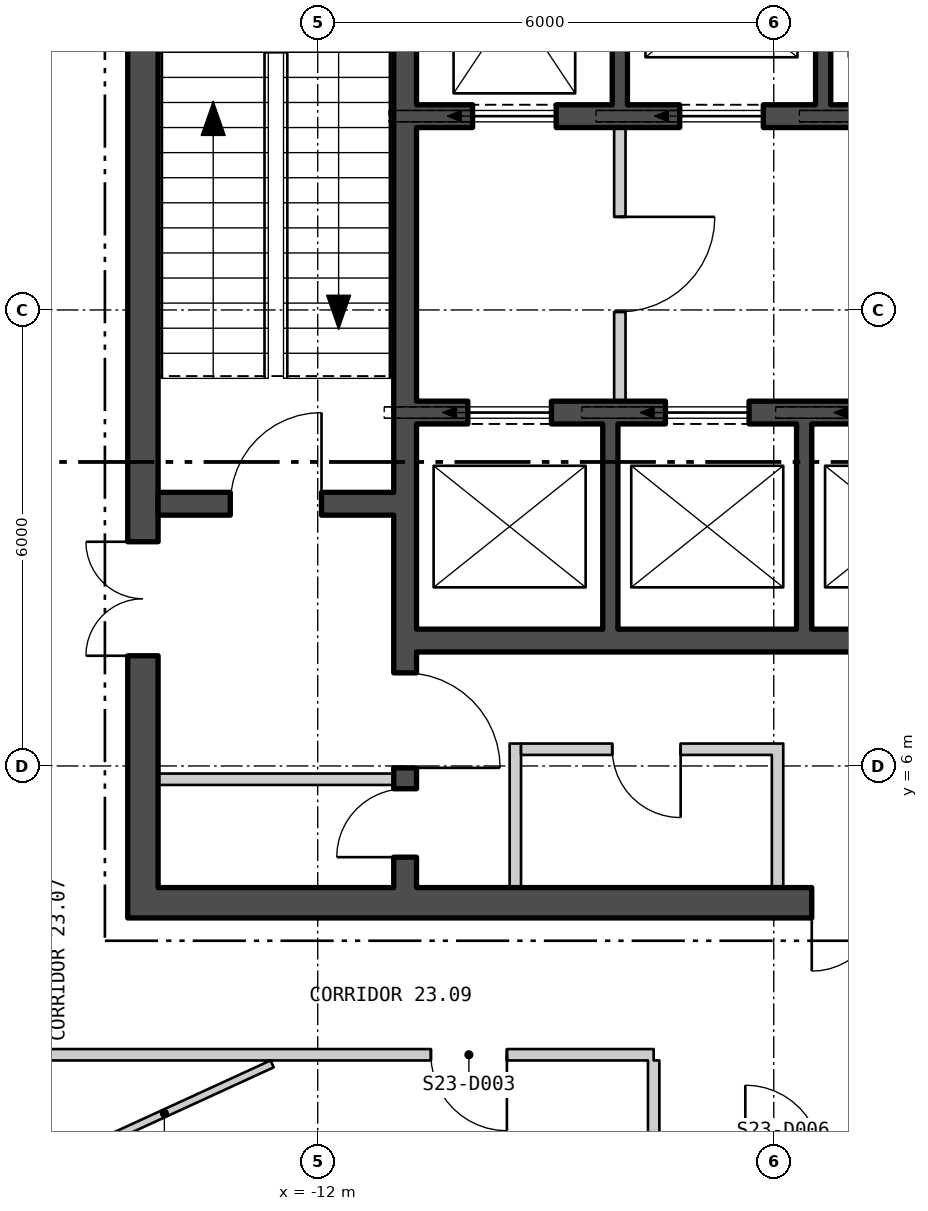
"""IFC4 building model, lengths in metres.
Left out: names, types, materials, properties, quantities, classifications, styles, units other than length and angle.
Written with IfcOpenShell. Run it as: python <this file> out.ifc"""

import sys

from ifc_helpers import new_model, si_unit, direction, frame, frame_2d, origin, place, context, subcontext, project, spatial, polyline, rectangle, outline, extrude, element, fill, save


model = new_model("IFC4")
c1 = context("Model", 3, precision=1e-05, world=origin(), true_north=direction((0.0, 1.0)))
c2 = subcontext(c1, "Body", "Model", "MODEL_VIEW")
j1 = project(units=[si_unit("LENGTHUNIT", "METRE"), si_unit("PLANEANGLEUNIT", "RADIAN")], contexts=[c1])
p1 = place(None, origin())
s1 = spatial("IfcSite", under=j1, at=p1, CompositionType="ELEMENT")
p2 = place(p1, origin())
s2 = spatial("IfcBuilding", under=s1, at=p2, CompositionType="ELEMENT")
p3 = place(p2, frame((0.0, 0.0, 304.2)))
s3 = spatial("IfcBuildingStorey", under=s2, at=p3, CompositionType="ELEMENT", Elevation=304.2)
p4 = place(p3, frame((-25.095, 16.112, -0.18), z_axis=(0.0, 0.0, 1.0), x_axis=(0.500000141277, -0.866025322218, 0.0)))
e1 = element("IfcWall", 1, at=p4, inside=s3, PredefinedType="SOLIDWALL", context=c2, shape_type="SweptSolid", body=[
    extrude(outline(polyline([(-0.13, -0.225), (45.86, -0.225), (45.6, 0.225), (0.13, 0.225), (-0.13, -0.225)])), origin(), (0.0, 0.0, 1.0), 3.98),
])
p5 = place(p4, frame((1.424, 0.0, 1.08)))
e2 = element("IfcOpeningElement", 2, at=p5, cuts=e1, PredefinedType="OPENING", context=c2, shape_type="SweptSolid", body=[
    extrude(rectangle(XDim=2.4, YDim=2.3, at=frame_2d((1.2, 1.15))), frame((0.0, 0.235, 0.0), z_axis=(0.0, -1.0, 0.0), x_axis=(1.0, 0.0, 0.0)), (0.0, 0.0, 1.0), 0.47),
])
p6 = place(p4, frame((5.892, 0.0, 1.08)))
e3 = element("IfcOpeningElement", 3, at=p6, cuts=e1, PredefinedType="OPENING", context=c2, shape_type="SweptSolid", body=[
    extrude(rectangle(XDim=2.4, YDim=2.3, at=frame_2d((1.2, 1.15))), frame((0.0, 0.235, 0.0), z_axis=(0.0, -1.0, 0.0), x_axis=(1.0, 0.0, 0.0)), (0.0, 0.0, 1.0), 0.47),
])
p7 = place(p4, frame((10.399, 0.0, 1.08)))
e4 = element("IfcOpeningElement", 4, at=p7, cuts=e1, PredefinedType="OPENING", context=c2, shape_type="SweptSolid", body=[
    extrude(rectangle(XDim=2.4, YDim=2.3, at=frame_2d((1.2, 1.15))), frame((0.0, 0.235, 0.0), z_axis=(0.0, -1.0, 0.0), x_axis=(1.0, 0.0, 0.0)), (0.0, 0.0, 1.0), 0.47),
])
p8 = place(p4, frame((14.905, 0.0, 1.08)))
e5 = element("IfcOpeningElement", 5, at=p8, cuts=e1, PredefinedType="OPENING", context=c2, shape_type="SweptSolid", body=[
    extrude(rectangle(XDim=2.4, YDim=2.3, at=frame_2d((1.2, 1.15))), frame((0.0, 0.235, 0.0), z_axis=(0.0, -1.0, 0.0), x_axis=(1.0, 0.0, 0.0)), (0.0, 0.0, 1.0), 0.47),
])
p9 = place(p4, frame((19.412, 0.0, 1.08)))
e6 = element("IfcOpeningElement", 6, at=p9, cuts=e1, PredefinedType="OPENING", context=c2, shape_type="SweptSolid", body=[
    extrude(rectangle(XDim=2.4, YDim=2.3, at=frame_2d((1.2, 1.15))), frame((0.0, 0.235, 0.0), z_axis=(0.0, -1.0, 0.0), x_axis=(1.0, 0.0, 0.0)), (0.0, 0.0, 1.0), 0.47),
])
p10 = place(p4, frame((28.425, 0.0, 1.08)))
e7 = element("IfcOpeningElement", 7, at=p10, cuts=e1, PredefinedType="OPENING", context=c2, shape_type="SweptSolid", body=[
    extrude(rectangle(XDim=2.4, YDim=2.3, at=frame_2d((1.2, 1.15))), frame((0.0, 0.235, 0.0), z_axis=(0.0, -1.0, 0.0), x_axis=(1.0, 0.0, 0.0)), (0.0, 0.0, 1.0), 0.47),
])
p11 = place(p4, frame((32.932, 0.0, 1.08)))
e8 = element("IfcOpeningElement", 8, at=p11, cuts=e1, PredefinedType="OPENING", context=c2, shape_type="SweptSolid", body=[
    extrude(rectangle(XDim=2.4, YDim=2.3, at=frame_2d((1.2, 1.15))), frame((0.0, 0.235, 0.0), z_axis=(0.0, -1.0, 0.0), x_axis=(1.0, 0.0, 0.0)), (0.0, 0.0, 1.0), 0.47),
])
p12 = place(p4, frame((37.438, 0.0, 1.08)))
e9 = element("IfcOpeningElement", 9, at=p12, cuts=e1, PredefinedType="OPENING", context=c2, shape_type="SweptSolid", body=[
    extrude(rectangle(XDim=2.4, YDim=2.3, at=frame_2d((1.2, 1.15))), frame((0.0, 0.235, 0.0), z_axis=(0.0, -1.0, 0.0), x_axis=(1.0, 0.0, 0.0)), (0.0, 0.0, 1.0), 0.47),
])
p13 = place(p4, frame((41.907, 0.0, 1.08)))
e10 = element("IfcOpeningElement", 10, at=p13, cuts=e1, PredefinedType="OPENING", context=c2, shape_type="SweptSolid", body=[
    extrude(rectangle(XDim=2.4, YDim=2.3, at=frame_2d((1.2, 1.15))), frame((0.0, 0.235, 0.0), z_axis=(0.0, -1.0, 0.0), x_axis=(1.0, 0.0, 0.0)), (0.0, 0.0, 1.0), 0.47),
])
p14 = place(p3, frame((-14.5, 4.2, 0.0), z_axis=(0.0, 0.0, 1.0), x_axis=(1.0, 0.0, 0.0)))
e11 = element("IfcWall", 11, at=p14, inside=s3, PredefinedType="SHEAR", context=c2, shape_type="SweptSolid", body=[
    extrude(rectangle(XDim=29.0, YDim=0.4, at=frame_2d((14.5, 0.0))), origin(), (0.0, 0.0, 1.0), 4.0),
])
p15 = place(p14, frame((9.0, 0.0, 0.0)))
e12 = element("IfcOpeningElement", 12, at=p15, cuts=e11, PredefinedType="OPENING", context=c2, shape_type="SweptSolid", body=[
    extrude(rectangle(XDim=1.8, YDim=2.4, at=frame_2d((0.9, 1.2))), frame((0.0, 0.21, 0.0), z_axis=(0.0, -1.0, 0.0), x_axis=(1.0, 0.0, 0.0)), (0.0, 0.0, 1.0), 0.42),
])
p16 = place(p14, frame((19.0, 0.0, 0.0)))
e13 = element("IfcOpeningElement", 13, at=p16, cuts=e11, PredefinedType="OPENING", context=c2, shape_type="SweptSolid", body=[
    extrude(rectangle(XDim=1.8, YDim=2.4, at=frame_2d((0.9, 1.2))), frame((0.0, 0.21, 0.0), z_axis=(0.0, -1.0, 0.0), x_axis=(1.0, 0.0, 0.0)), (0.0, 0.0, 1.0), 0.42),
])
p17 = place(p3, frame((-14.3, 4.4, 0.0), z_axis=(0.0, 0.0, 1.0), x_axis=(0.0, 1.0, 0.0)))
e14 = element("IfcWall", 14, at=p17, inside=s3, PredefinedType="SHEAR", context=c2, shape_type="SweptSolid", body=[
    extrude(rectangle(XDim=13.2, YDim=0.4, at=frame_2d((6.6, 0.0))), origin(), (0.0, 0.0, 1.0), 4.0),
])
p18 = place(p17, frame((3.05, 0.0, 0.0)))
e15 = element("IfcOpeningElement", 15, at=p18, cuts=e14, PredefinedType="OPENING", context=c2, shape_type="SweptSolid", body=[
    extrude(rectangle(XDim=1.5, YDim=2.1, at=frame_2d((0.75, 1.05))), frame((0.0, 0.21, 0.0), z_axis=(0.0, -1.0, 0.0), x_axis=(1.0, 0.0, 0.0)), (0.0, 0.0, 1.0), 0.42),
])
p19 = place(p3, frame((-10.85, 4.4, 0.0), z_axis=(0.0, 0.0, 1.0), x_axis=(0.0, 1.0, 0.0)))
e16 = element("IfcWall", 16, at=p19, inside=s3, PredefinedType="SHEAR", context=c2, shape_type="SweptSolid", body=[
    extrude(rectangle(XDim=13.2, YDim=0.3, at=frame_2d((6.6, 0.0))), origin(), (0.0, 0.0, 1.0), 4.0),
])
p20 = place(p19, frame((1.575, 0.0, 0.0)))
e17 = element("IfcOpeningElement", 17, at=p20, cuts=e16, PredefinedType="OPENING", context=c2, shape_type="SweptSolid", body=[
    extrude(rectangle(XDim=1.25, YDim=2.1, at=frame_2d((0.625, 1.05))), frame((0.0, 0.16, 0.0), z_axis=(0.0, -1.0, 0.0), x_axis=(1.0, 0.0, 0.0)), (0.0, 0.0, 1.0), 0.32),
])
p21 = place(p19, frame((0.4, 0.0, 0.0)))
e18 = element("IfcOpeningElement", 18, at=p21, cuts=e16, PredefinedType="OPENING", context=c2, shape_type="SweptSolid", body=[
    extrude(rectangle(XDim=0.9, YDim=2.1, at=frame_2d((0.45, 1.05))), frame((0.0, 0.16, 0.0), z_axis=(0.0, -1.0, 0.0), x_axis=(1.0, 0.0, 0.0)), (0.0, 0.0, 1.0), 0.32),
])
p22 = place(p3, frame((-14.1, 9.45, 0.0), z_axis=(0.0, 0.0, 1.0), x_axis=(1.0, 0.0, 0.0)))
e19 = element("IfcWall", 19, at=p22, inside=s3, PredefinedType="SHEAR", context=c2, shape_type="SweptSolid", body=[
    extrude(rectangle(XDim=3.1, YDim=0.3, at=frame_2d((1.55, 0.0))), origin(), (0.0, 0.0, 1.0), 4.0),
])
p23 = place(p22, frame((0.95, 0.0, 0.0)))
e20 = element("IfcOpeningElement", 20, at=p23, cuts=e19, PredefinedType="OPENING", context=c2, shape_type="SweptSolid", body=[
    extrude(rectangle(XDim=1.2, YDim=2.1, at=frame_2d((0.6, 1.05))), frame((0.0, 0.16, 0.0), z_axis=(0.0, -1.0, 0.0), x_axis=(1.0, 0.0, 0.0)), (0.0, 0.0, 1.0), 0.32),
])
p24 = place(p3, frame((-10.7, 14.55, 0.0), z_axis=(0.0, 0.0, 1.0), x_axis=(1.0, 0.0, 0.0)))
e21 = element("IfcWall", 21, at=p24, inside=s3, PredefinedType="SHEAR", context=c2, shape_type="SweptSolid", body=[
    extrude(rectangle(XDim=21.4, YDim=0.3, at=frame_2d((10.7, 0.0))), origin(), (0.0, 0.0, 1.0), 4.0),
])
p25 = place(p24, frame((0.738, 0.0, 0.0)))
e22 = element("IfcOpeningElement", 22, at=p25, cuts=e21, PredefinedType="OPENING", context=c2, shape_type="SweptSolid", body=[
    extrude(rectangle(XDim=1.1, YDim=2.1, at=frame_2d((0.55, 1.05))), frame((0.0, 0.16, 0.0), z_axis=(0.0, -1.0, 0.0), x_axis=(1.0, 0.0, 0.0)), (0.0, 0.0, 1.0), 0.32),
])
p26 = place(p24, frame((3.462, 0.0, 0.0)))
e23 = element("IfcOpeningElement", 23, at=p26, cuts=e21, PredefinedType="OPENING", context=c2, shape_type="SweptSolid", body=[
    extrude(rectangle(XDim=1.1, YDim=2.1, at=frame_2d((0.55, 1.05))), frame((0.0, 0.16, 0.0), z_axis=(0.0, -1.0, 0.0), x_axis=(1.0, 0.0, 0.0)), (0.0, 0.0, 1.0), 0.32),
])
p27 = place(p24, frame((6.138, 0.0, 0.0)))
e24 = element("IfcOpeningElement", 24, at=p27, cuts=e21, PredefinedType="OPENING", context=c2, shape_type="SweptSolid", body=[
    extrude(rectangle(XDim=1.1, YDim=2.1, at=frame_2d((0.55, 1.05))), frame((0.0, 0.16, 0.0), z_axis=(0.0, -1.0, 0.0), x_axis=(1.0, 0.0, 0.0)), (0.0, 0.0, 1.0), 0.32),
])
p28 = place(p24, frame((8.812, 0.0, 0.0)))
e25 = element("IfcOpeningElement", 25, at=p28, cuts=e21, PredefinedType="OPENING", context=c2, shape_type="SweptSolid", body=[
    extrude(rectangle(XDim=1.1, YDim=2.1, at=frame_2d((0.55, 1.05))), frame((0.0, 0.16, 0.0), z_axis=(0.0, -1.0, 0.0), x_axis=(1.0, 0.0, 0.0)), (0.0, 0.0, 1.0), 0.32),
])
p29 = place(p24, frame((19.562, 0.0, 0.0)))
e26 = element("IfcOpeningElement", 26, at=p29, cuts=e21, PredefinedType="OPENING", context=c2, shape_type="SweptSolid", body=[
    extrude(rectangle(XDim=1.1, YDim=2.1, at=frame_2d((0.55, 1.05))), frame((0.0, 0.16, 0.0), z_axis=(0.0, -1.0, 0.0), x_axis=(1.0, 0.0, 0.0)), (0.0, 0.0, 1.0), 0.32),
])
p30 = place(p24, frame((11.537, 0.0, 0.0)))
e27 = element("IfcOpeningElement", 27, at=p30, cuts=e21, PredefinedType="OPENING", context=c2, shape_type="SweptSolid", body=[
    extrude(rectangle(XDim=1.0, YDim=2.1, at=frame_2d((0.5, 1.05))), frame((0.0, 0.16, 0.0), z_axis=(0.0, -1.0, 0.0), x_axis=(1.0, 0.0, 0.0)), (0.0, 0.0, 1.0), 0.32),
])
p31 = place(p24, frame((14.213, 0.0, 0.0)))
e28 = element("IfcOpeningElement", 28, at=p31, cuts=e21, PredefinedType="OPENING", context=c2, shape_type="SweptSolid", body=[
    extrude(rectangle(XDim=1.0, YDim=2.1, at=frame_2d((0.5, 1.05))), frame((0.0, 0.16, 0.0), z_axis=(0.0, -1.0, 0.0), x_axis=(1.0, 0.0, 0.0)), (0.0, 0.0, 1.0), 0.32),
])
p32 = place(p24, frame((16.887, 0.0, 0.0)))
e29 = element("IfcOpeningElement", 29, at=p32, cuts=e21, PredefinedType="OPENING", context=c2, shape_type="SweptSolid", body=[
    extrude(rectangle(XDim=1.0, YDim=2.1, at=frame_2d((0.5, 1.05))), frame((0.0, 0.16, 0.0), z_axis=(0.0, -1.0, 0.0), x_axis=(1.0, 0.0, 0.0)), (0.0, 0.0, 1.0), 0.32),
])
p33 = place(p3, frame((-10.7, 10.65, 0.0), z_axis=(0.0, 0.0, 1.0), x_axis=(1.0, 0.0, 0.0)))
e30 = element("IfcWall", 30, at=p33, inside=s3, PredefinedType="SHEAR", context=c2, shape_type="SweptSolid", body=[
    extrude(rectangle(XDim=10.3, YDim=0.3, at=frame_2d((5.15, 0.0))), origin(), (0.0, 0.0, 1.0), 4.0),
])
p34 = place(p33, frame((0.675, 0.0, 0.0)))
e31 = element("IfcOpeningElement", 31, at=p34, cuts=e30, PredefinedType="OPENING", context=c2, shape_type="SweptSolid", body=[
    extrude(rectangle(XDim=1.1, YDim=2.1, at=frame_2d((0.55, 1.05))), frame((0.0, 0.16, 0.0), z_axis=(0.0, -1.0, 0.0), x_axis=(1.0, 0.0, 0.0)), (0.0, 0.0, 1.0), 0.32),
])
p35 = place(p33, frame((3.275, 0.0, 0.0)))
e32 = element("IfcOpeningElement", 32, at=p35, cuts=e30, PredefinedType="OPENING", context=c2, shape_type="SweptSolid", body=[
    extrude(rectangle(XDim=1.1, YDim=2.1, at=frame_2d((0.55, 1.05))), frame((0.0, 0.16, 0.0), z_axis=(0.0, -1.0, 0.0), x_axis=(1.0, 0.0, 0.0)), (0.0, 0.0, 1.0), 0.32),
])
p36 = place(p33, frame((5.825, 0.0, 0.0)))
e33 = element("IfcOpeningElement", 33, at=p36, cuts=e30, PredefinedType="OPENING", context=c2, shape_type="SweptSolid", body=[
    extrude(rectangle(XDim=1.1, YDim=2.1, at=frame_2d((0.55, 1.05))), frame((0.0, 0.16, 0.0), z_axis=(0.0, -1.0, 0.0), x_axis=(1.0, 0.0, 0.0)), (0.0, 0.0, 1.0), 0.32),
])
p37 = place(p33, frame((8.425, 0.0, 0.0)))
e34 = element("IfcOpeningElement", 34, at=p37, cuts=e30, PredefinedType="OPENING", context=c2, shape_type="SweptSolid", body=[
    extrude(rectangle(XDim=1.0, YDim=2.1, at=frame_2d((0.5, 1.05))), frame((0.0, 0.16, 0.0), z_axis=(0.0, -1.0, 0.0), x_axis=(1.0, 0.0, 0.0)), (0.0, 0.0, 1.0), 0.32),
])
p38 = place(p3, frame((-10.7, 7.65, 0.0), z_axis=(0.0, 0.0, 1.0), x_axis=(1.0, 0.0, 0.0)))
e35 = element("IfcWall", 35, at=p38, inside=s3, PredefinedType="SHEAR", context=c2, shape_type="SweptSolid", body=[
    extrude(rectangle(XDim=10.3, YDim=0.3, at=frame_2d((5.15, 0.0))), origin(), (0.0, 0.0, 1.0), 4.0),
])
for number, where, z_axis, x_axis in (
    (36, (-8.025, 14.7, 0.0), (0.0, 0.0, 1.0), (0.0, 1.0, 0.0)),
    (37, (-5.35, 14.7, 0.0), (0.0, 0.0, 1.0), (0.0, 1.0, 0.0)),
):
    element("IfcWall", number, at=place(p3, frame(where, z_axis=z_axis, x_axis=x_axis)), inside=s3, PredefinedType="SHEAR", context=c2, shape_type="SweptSolid", body=[
        extrude(rectangle(XDim=2.9, YDim=0.2, at=frame_2d((1.45, 0.0))), origin(), (0.0, 0.0, 1.0), 4.0),
    ])
for number, where, z_axis, x_axis in (
    (38, (-8.15, 7.8, 0.0), (0.0, 0.0, 1.0), (0.0, 1.0, 0.0)),
    (39, (-5.6, 7.8, 0.0), (0.0, 0.0, 1.0), (0.0, 1.0, 0.0)),
):
    element("IfcWall", number, at=place(p3, frame(where, z_axis=z_axis, x_axis=x_axis)), inside=s3, PredefinedType="SHEAR", context=c2, shape_type="SweptSolid", body=[
        extrude(rectangle(XDim=2.7, YDim=0.2, at=frame_2d((1.35, 0.0))), origin(), (0.0, 0.0, 1.0), 4.0),
    ])
p39 = place(p3, frame((-8.025, 10.8, 0.0), z_axis=(0.0, 0.0, 1.0), x_axis=(0.0, 1.0, 0.0)))
e40 = element("IfcWall", 40, at=p39, inside=s3, PredefinedType="PARTITIONING", context=c2, shape_type="SweptSolid", body=[
    extrude(rectangle(XDim=3.6, YDim=0.15, at=frame_2d((1.8, 0.0))), origin(), (0.0, 0.0, 1.0), 4.0),
])
p40 = place(p39, frame((1.175, 0.0, 0.0)))
e41 = element("IfcOpeningElement", 41, at=p40, cuts=e40, PredefinedType="OPENING", context=c2, shape_type="SweptSolid", body=[
    extrude(rectangle(XDim=1.25, YDim=2.1, at=frame_2d((0.625, 1.05))), frame((0.0, 0.085, 0.0), z_axis=(0.0, -1.0, 0.0), x_axis=(1.0, 0.0, 0.0)), (0.0, 0.0, 1.0), 0.17),
])
p41 = place(p3, frame((-14.1, 5.825, 0.0), z_axis=(0.0, 0.0, 1.0), x_axis=(1.0, 0.0, 0.0)))
e42 = element("IfcWall", 42, at=p41, inside=s3, PredefinedType="PARTITIONING", context=c2, shape_type="SweptSolid", body=[
    extrude(rectangle(XDim=3.1, YDim=0.15, at=frame_2d((1.55, 0.0))), origin(), (0.0, 0.0, 1.0), 4.0),
])
for number, where, z_axis, x_axis in (
    (43, (-9.4, 4.4, 0.0), (0.0, 0.0, 1.0), (0.0, 1.0, 0.0)),
    (44, (-5.95, 4.4, 0.0), (0.0, 0.0, 1.0), (0.0, 1.0, 0.0)),
):
    element("IfcWall", number, at=place(p3, frame(where, z_axis=z_axis, x_axis=x_axis)), inside=s3, PredefinedType="PARTITIONING", context=c2, shape_type="SweptSolid", body=[
        extrude(rectangle(XDim=1.895, YDim=0.15, at=frame_2d((0.948, 0.0))), origin(), (0.0, 0.0, 1.0), 4.0),
    ])
p42 = place(p3, frame((-9.325, 6.22, 0.0), z_axis=(0.0, 0.0, 1.0), x_axis=(1.0, 0.0, 0.0)))
e45 = element("IfcWall", 45, at=p42, inside=s3, PredefinedType="PARTITIONING", context=c2, shape_type="SweptSolid", body=[
    extrude(rectangle(XDim=3.3, YDim=0.15, at=frame_2d((1.65, 0.0))), origin(), (0.0, 0.0, 1.0), 4.0),
])
p43 = place(p42, frame((1.2, 0.0, 0.0)))
e46 = element("IfcOpeningElement", 46, at=p43, cuts=e45, PredefinedType="OPENING", context=c2, shape_type="SweptSolid", body=[
    extrude(rectangle(XDim=0.9, YDim=2.1, at=frame_2d((0.45, 1.05))), frame((0.0, 0.085, 0.0), z_axis=(0.0, -1.0, 0.0), x_axis=(1.0, 0.0, 0.0)), (0.0, 0.0, 1.0), 0.17),
])
p44 = place(p3, frame((-16.225, 2.2, 0.0), z_axis=(0.0, 0.0, 1.0), x_axis=(1.0, 0.0, 0.0)))
e47 = element("IfcWall", 47, at=p44, inside=s3, PredefinedType="PARTITIONING", context=c2, shape_type="SweptSolid", body=[
    extrude(rectangle(XDim=8.645, YDim=0.15, at=frame_2d((4.322, 0.0))), origin(), (0.0, 0.0, 1.0), 4.0),
])
p45 = place(p44, frame((5.714, 0.0, 0.0)))
e48 = element("IfcOpeningElement", 48, at=p45, cuts=e47, PredefinedType="OPENING", context=c2, shape_type="SweptSolid", body=[
    extrude(rectangle(XDim=1.0, YDim=2.1, at=frame_2d((0.5, 1.05))), frame((0.0, 0.085, 0.0), z_axis=(0.0, -1.0, 0.0), x_axis=(1.0, 0.0, 0.0)), (0.0, 0.0, 1.0), 0.17),
])
p46 = place(p3, frame((-15.435, 0.779, 0.0), z_axis=(0.0, 0.0, 1.0), x_axis=(0.908867400556, 0.417085180996, 0.0)))
e49 = element("IfcWall", 49, at=p46, inside=s3, PredefinedType="PARTITIONING", context=c2, shape_type="SweptSolid", body=[
    extrude(rectangle(XDim=3.119, YDim=0.1, at=frame_2d((1.56, 0.0))), origin(), (0.0, 0.0, 1.0), 4.0),
])
p47 = place(p3, frame((-7.58, 0.875, 0.0), z_axis=(0.0, 0.0, 1.0), x_axis=(0.0, 1.0, 0.0)))
e50 = element("IfcWall", 50, at=p47, inside=s3, PredefinedType="PARTITIONING", context=c2, shape_type="SweptSolid", body=[
    extrude(rectangle(XDim=1.25, YDim=0.15, at=frame_2d((0.625, 0.0))), origin(), (0.0, 0.0, 1.0), 4.0),
])
p48 = place(p25, origin())
e51 = element("IfcDoor", 51, at=p48, inside=s3, OperationType="SLIDING_TO_LEFT", PredefinedType="DOOR", context=c2, shape_type="SweptSolid", body=[
    extrude(rectangle(XDim=1.1, YDim=2.1, at=frame_2d((0.55, 1.05))), frame((0.0, 0.025, 0.0), z_axis=(0.0, -1.0, 0.0), x_axis=(1.0, 0.0, 0.0)), (0.0, 0.0, 1.0), 0.05),
])
fill(e22, e51)
p49 = place(p26, origin())
e52 = element("IfcDoor", 52, at=p49, inside=s3, OperationType="SLIDING_TO_LEFT", PredefinedType="DOOR", context=c2, shape_type="SweptSolid", body=[
    extrude(rectangle(XDim=1.1, YDim=2.1, at=frame_2d((0.55, 1.05))), frame((0.0, 0.025, 0.0), z_axis=(0.0, -1.0, 0.0), x_axis=(1.0, 0.0, 0.0)), (0.0, 0.0, 1.0), 0.05),
])
fill(e23, e52)
p50 = place(p34, origin())
e53 = element("IfcDoor", 53, at=p50, inside=s3, OperationType="SLIDING_TO_LEFT", PredefinedType="DOOR", context=c2, shape_type="SweptSolid", body=[
    extrude(rectangle(XDim=1.1, YDim=2.1, at=frame_2d((0.55, 1.05))), frame((0.0, 0.025, 0.0), z_axis=(0.0, -1.0, 0.0), x_axis=(1.0, 0.0, 0.0)), (0.0, 0.0, 1.0), 0.05),
])
fill(e31, e53)
p51 = place(p35, origin())
e54 = element("IfcDoor", 54, at=p51, inside=s3, OperationType="SLIDING_TO_LEFT", PredefinedType="DOOR", context=c2, shape_type="SweptSolid", body=[
    extrude(rectangle(XDim=1.1, YDim=2.1, at=frame_2d((0.55, 1.05))), frame((0.0, 0.025, 0.0), z_axis=(0.0, -1.0, 0.0), x_axis=(1.0, 0.0, 0.0)), (0.0, 0.0, 1.0), 0.05),
])
fill(e32, e54)
p52 = place(p40, origin())
e55 = element("IfcDoor", 55, at=p52, inside=s3, OperationType="SINGLE_SWING_RIGHT", PredefinedType="DOOR", context=c2, shape_type="SweptSolid", body=[
    extrude(rectangle(XDim=1.25, YDim=2.1, at=frame_2d((0.625, 1.05))), frame((0.0, 0.025, 0.0), z_axis=(0.0, -1.0, 0.0), x_axis=(1.0, 0.0, 0.0)), (0.0, 0.0, 1.0), 0.05),
])
fill(e41, e55)
p53 = place(p23, origin())
e56 = element("IfcDoor", 56, at=p53, inside=s3, OperationType="SINGLE_SWING_LEFT", PredefinedType="DOOR", context=c2, shape_type="SweptSolid", body=[
    extrude(rectangle(XDim=1.2, YDim=2.1, at=frame_2d((0.6, 1.05))), frame((0.0, 0.025, 0.0), z_axis=(0.0, -1.0, 0.0), x_axis=(1.0, 0.0, 0.0)), (0.0, 0.0, 1.0), 0.05),
])
fill(e20, e56)
p54 = place(p20, origin())
e57 = element("IfcDoor", 57, at=p54, inside=s3, OperationType="SINGLE_SWING_LEFT", PredefinedType="DOOR", context=c2, shape_type="SweptSolid", body=[
    extrude(rectangle(XDim=1.25, YDim=2.1, at=frame_2d((0.625, 1.05))), frame((0.0, 0.025, 0.0), z_axis=(0.0, -1.0, 0.0), x_axis=(1.0, 0.0, 0.0)), (0.0, 0.0, 1.0), 0.05),
])
fill(e17, e57)
p55 = place(p18, origin())
e58 = element("IfcDoor", 58, at=p55, inside=s3, OperationType="DOUBLE_DOOR_SINGLE_SWING", PredefinedType="DOOR", context=c2, shape_type="SweptSolid", body=[
    extrude(rectangle(XDim=1.5, YDim=2.1, at=frame_2d((0.75, 1.05))), frame((0.0, 0.025, 0.0), z_axis=(0.0, -1.0, 0.0), x_axis=(1.0, 0.0, 0.0)), (0.0, 0.0, 1.0), 0.05),
])
fill(e15, e58)
p56 = place(p21, origin())
e59 = element("IfcDoor", 59, at=p56, inside=s3, OperationType="SINGLE_SWING_RIGHT", PredefinedType="DOOR", context=c2, shape_type="SweptSolid", body=[
    extrude(rectangle(XDim=0.9, YDim=2.1, at=frame_2d((0.45, 1.05))), frame((0.0, 0.025, 0.0), z_axis=(0.0, -1.0, 0.0), x_axis=(1.0, 0.0, 0.0)), (0.0, 0.0, 1.0), 0.05),
])
fill(e18, e59)
p57 = place(p43, origin())
e60 = element("IfcDoor", 60, at=p57, inside=s3, OperationType="SINGLE_SWING_RIGHT", PredefinedType="DOOR", context=c2, shape_type="SweptSolid", body=[
    extrude(rectangle(XDim=0.9, YDim=2.1, at=frame_2d((0.45, 1.05))), frame((0.0, 0.025, 0.0), z_axis=(0.0, -1.0, 0.0), x_axis=(1.0, 0.0, 0.0)), (0.0, 0.0, 1.0), 0.05),
])
fill(e46, e60)
p58 = place(p15, origin())
e61 = element("IfcDoor", 61, at=p58, inside=s3, OperationType="DOUBLE_DOOR_SINGLE_SWING", PredefinedType="DOOR", context=c2, shape_type="SweptSolid", body=[
    extrude(rectangle(XDim=1.8, YDim=2.4, at=frame_2d((0.9, 1.2))), frame((0.0, 0.025, 0.0), z_axis=(0.0, -1.0, 0.0), x_axis=(1.0, 0.0, 0.0)), (0.0, 0.0, 1.0), 0.05),
])
fill(e12, e61)
p59 = place(p45, origin())
e62 = element("IfcDoor", 62, at=p59, inside=s3, OperationType="SINGLE_SWING_RIGHT", PredefinedType="DOOR", context=c2, shape_type="SweptSolid", body=[
    extrude(rectangle(XDim=1.0, YDim=2.1, at=frame_2d((0.5, 1.05))), frame((0.0, 0.025, 0.0), z_axis=(0.0, -1.0, 0.0), x_axis=(1.0, 0.0, 0.0)), (0.0, 0.0, 1.0), 0.05),
])
fill(e48, e62)
save(model, sys.argv[1])
